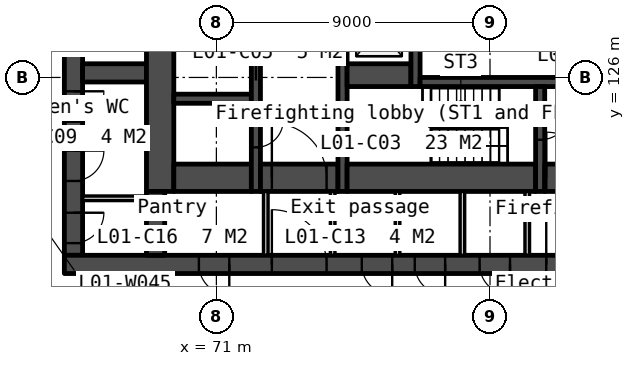
"""IFC4 building model, lengths in metres.
Left out: names, types, materials, properties, quantities, classifications, styles, units other than length and angle.
Written with IfcOpenShell. Run it as: python <this file> out.ifc"""

import sys

from ifc_helpers import new_model, si_unit, direction, frame, frame_2d, origin, place, context, subcontext, project, spatial, rectangle, extrude, element, fill, save


model = new_model("IFC4")
c1 = context("Model", 3, precision=1e-05, world=origin(), true_north=direction((0.0, 1.0)))
c2 = subcontext(c1, "Body", "Model", "MODEL_VIEW")
j1 = project(units=[si_unit("LENGTHUNIT", "METRE"), si_unit("PLANEANGLEUNIT", "RADIAN")], contexts=[c1])
p1 = place(None, origin())
s1 = spatial("IfcSite", under=j1, at=p1, CompositionType="ELEMENT")
p2 = place(p1, origin())
s2 = spatial("IfcBuilding", under=s1, at=p2, CompositionType="ELEMENT")
p3 = place(p2, frame((0.0, 0.0, 7.5)))
s3 = spatial("IfcBuildingStorey", under=s2, at=p3, CompositionType="ELEMENT", Elevation=7.5)
p4 = place(p3, frame((66.3, 133.95, 0.0), z_axis=(0.0, 0.0, 1.0), x_axis=(0.0, -1.0, 0.0)))
e1 = element("IfcWall", 1, at=p4, inside=s3, PredefinedType="SOLIDWALL", context=c2, shape_type="SweptSolid", body=[
    extrude(rectangle(XDim=13.8, YDim=0.6, at=frame_2d((6.9, 0.0))), origin(), (0.0, 0.0, 1.0), 5.7),
])
p5 = place(p4, frame((0.6, 0.0, 0.0)))
e2 = element("IfcOpeningElement", 2, at=p5, cuts=e1, PredefinedType="OPENING", context=c2, shape_type="SweptSolid", body=[
    extrude(rectangle(XDim=1.1, YDim=2.1, at=frame_2d((0.55, 1.05))), frame((0.0, 0.31, 0.0), z_axis=(0.0, -1.0, 0.0), x_axis=(1.0, 0.0, 0.0)), (0.0, 0.0, 1.0), 0.62),
])
p6 = place(p4, frame((8.405, 0.0, 0.0)))
e3 = element("IfcOpeningElement", 3, at=p6, cuts=e1, PredefinedType="OPENING", context=c2, shape_type="SweptSolid", body=[
    extrude(rectangle(XDim=1.0, YDim=2.1, at=frame_2d((0.5, 1.05))), frame((0.0, 0.31, 0.0), z_axis=(0.0, -1.0, 0.0), x_axis=(1.0, 0.0, 0.0)), (0.0, 0.0, 1.0), 0.62),
])
p7 = place(p4, frame((10.355, 0.0, 0.0)))
e4 = element("IfcOpeningElement", 4, at=p7, cuts=e1, PredefinedType="OPENING", context=c2, shape_type="SweptSolid", body=[
    extrude(rectangle(XDim=1.0, YDim=2.1, at=frame_2d((0.5, 1.05))), frame((0.0, 0.31, 0.0), z_axis=(0.0, -1.0, 0.0), x_axis=(1.0, 0.0, 0.0)), (0.0, 0.0, 1.0), 0.62),
])
p8 = place(p4, frame((12.4, 0.0, 0.0)))
e5 = element("IfcOpeningElement", 5, at=p8, cuts=e1, PredefinedType="OPENING", context=c2, shape_type="SweptSolid", body=[
    extrude(rectangle(XDim=1.0, YDim=2.1, at=frame_2d((0.5, 1.05))), frame((0.0, 0.31, 0.0), z_axis=(0.0, -1.0, 0.0), x_axis=(1.0, 0.0, 0.0)), (0.0, 0.0, 1.0), 0.62),
])
p9 = place(p3, frame((66.0, 119.85, 0.0), z_axis=(0.0, 0.0, 1.0), x_axis=(1.0, 0.0, 0.0)))
e6 = element("IfcWall", 6, at=p9, inside=s3, PredefinedType="SOLIDWALL", context=c2, shape_type="SweptSolid", body=[
    extrude(rectangle(XDim=28.0, YDim=0.6, at=frame_2d((14.0, 0.0))), origin(), (0.0, 0.0, 1.0), 5.7),
])
p10 = place(p9, frame((6.825, 0.0, 0.0)))
e7 = element("IfcOpeningElement", 7, at=p10, cuts=e6, PredefinedType="OPENING", context=c2, shape_type="SweptSolid", body=[
    extrude(rectangle(XDim=1.8, YDim=2.1, at=frame_2d((0.9, 1.05))), frame((0.0, 0.31, 0.0), z_axis=(0.0, -1.0, 0.0), x_axis=(1.0, 0.0, 0.0)), (0.0, 0.0, 1.0), 0.62),
])
p11 = place(p9, frame((15.85, 0.0, 0.0)))
e8 = element("IfcOpeningElement", 8, at=p11, cuts=e6, PredefinedType="OPENING", context=c2, shape_type="SweptSolid", body=[
    extrude(rectangle(XDim=1.5, YDim=2.1, at=frame_2d((0.75, 1.05))), frame((0.0, 0.31, 0.0), z_axis=(0.0, -1.0, 0.0), x_axis=(1.0, 0.0, 0.0)), (0.0, 0.0, 1.0), 0.62),
])
p12 = place(p9, frame((19.375, 0.0, 0.0)))
e9 = element("IfcOpeningElement", 9, at=p12, cuts=e6, PredefinedType="OPENING", context=c2, shape_type="SweptSolid", body=[
    extrude(rectangle(XDim=1.8, YDim=2.1, at=frame_2d((0.9, 1.05))), frame((0.0, 0.31, 0.0), z_axis=(0.0, -1.0, 0.0), x_axis=(1.0, 0.0, 0.0)), (0.0, 0.0, 1.0), 0.62),
])
p13 = place(p9, frame((4.425, 0.0, 0.0)))
e10 = element("IfcOpeningElement", 10, at=p13, cuts=e6, PredefinedType="OPENING", context=c2, shape_type="SweptSolid", body=[
    extrude(rectangle(XDim=1.0, YDim=2.1, at=frame_2d((0.5, 1.05))), frame((0.0, 0.31, 0.0), z_axis=(0.0, -1.0, 0.0), x_axis=(1.0, 0.0, 0.0)), (0.0, 0.0, 1.0), 0.62),
])
p14 = place(p9, frame((9.783, 0.0, 0.0)))
e11 = element("IfcOpeningElement", 11, at=p14, cuts=e6, PredefinedType="OPENING", context=c2, shape_type="SweptSolid", body=[
    extrude(rectangle(XDim=1.0, YDim=2.1, at=frame_2d((0.5, 1.05))), frame((0.0, 0.31, 0.0), z_axis=(0.0, -1.0, 0.0), x_axis=(1.0, 0.0, 0.0)), (0.0, 0.0, 1.0), 0.62),
])
p15 = place(p9, frame((11.525, 0.0, 0.0)))
e12 = element("IfcOpeningElement", 12, at=p15, cuts=e6, PredefinedType="OPENING", context=c2, shape_type="SweptSolid", body=[
    extrude(rectangle(XDim=1.0, YDim=2.1, at=frame_2d((0.5, 1.05))), frame((0.0, 0.31, 0.0), z_axis=(0.0, -1.0, 0.0), x_axis=(1.0, 0.0, 0.0)), (0.0, 0.0, 1.0), 0.62),
])
p16 = place(p9, frame((13.658, 0.0, 0.0)))
e13 = element("IfcOpeningElement", 13, at=p16, cuts=e6, PredefinedType="OPENING", context=c2, shape_type="SweptSolid", body=[
    extrude(rectangle(XDim=1.0, YDim=2.1, at=frame_2d((0.5, 1.05))), frame((0.0, 0.31, 0.0), z_axis=(0.0, -1.0, 0.0), x_axis=(1.0, 0.0, 0.0)), (0.0, 0.0, 1.0), 0.62),
])
p17 = place(p9, frame((21.725, 0.0, 0.0)))
e14 = element("IfcOpeningElement", 14, at=p17, cuts=e6, PredefinedType="OPENING", context=c2, shape_type="SweptSolid", body=[
    extrude(rectangle(XDim=1.0, YDim=2.1, at=frame_2d((0.5, 1.05))), frame((0.0, 0.31, 0.0), z_axis=(0.0, -1.0, 0.0), x_axis=(1.0, 0.0, 0.0)), (0.0, 0.0, 1.0), 0.62),
])
p18 = place(p9, frame((23.425, 0.0, 0.0)))
e15 = element("IfcOpeningElement", 15, at=p18, cuts=e6, PredefinedType="OPENING", context=c2, shape_type="SweptSolid", body=[
    extrude(rectangle(XDim=1.0, YDim=2.1, at=frame_2d((0.5, 1.05))), frame((0.0, 0.31, 0.0), z_axis=(0.0, -1.0, 0.0), x_axis=(1.0, 0.0, 0.0)), (0.0, 0.0, 1.0), 0.62),
])
p19 = place(p3, frame((66.6, 126.15, 0.0), z_axis=(0.0, 0.0, 1.0), x_axis=(1.0, 0.0, 0.0)))
e16 = element("IfcWall", 16, at=p19, inside=s3, PredefinedType="SOLIDWALL", context=c2, shape_type="SweptSolid", body=[
    extrude(rectangle(XDim=2.1, YDim=0.6, at=frame_2d((1.05, 0.0))), origin(), (0.0, 0.0, 1.0), 5.7),
])
for number, where, z_axis, x_axis in (
    (17, (66.6, 124.165, 0.0), (0.0, 0.0, 1.0), (1.0, 0.0, 0.0)),
    (18, (66.6, 122.025, 0.0), (0.0, 0.0, 1.0), (1.0, 0.0, 0.0)),
):
    element("IfcWall", number, at=place(p3, frame(where, z_axis=z_axis, x_axis=x_axis)), inside=s3, PredefinedType="PARTITIONING", context=c2, shape_type="SweptSolid", body=[
        extrude(rectangle(XDim=2.1, YDim=0.15, at=frame_2d((1.05, 0.0))), origin(), (0.0, 0.0, 1.0), 5.7),
    ])
p20 = place(p3, frame((69.15, 133.95, 0.0), z_axis=(0.0, 0.0, 1.0), x_axis=(0.0, -1.0, 0.0)))
e19 = element("IfcWall", 19, at=p20, inside=s3, PredefinedType="SOLIDWALL", context=c2, shape_type="SweptSolid", body=[
    extrude(rectangle(XDim=11.7, YDim=0.9, at=frame_2d((5.85, 0.0))), origin(), (0.0, 0.0, 1.0), 5.7),
])
p21 = place(p3, frame((69.0, 122.25, 0.0), z_axis=(0.0, 0.0, 1.0), x_axis=(0.0, -1.0, 0.0)))
e20 = element("IfcWall", 20, at=p21, inside=s3, PredefinedType="SOLIDWALL", context=c2, shape_type="SweptSolid", body=[
    extrude(rectangle(XDim=2.1, YDim=0.6, at=frame_2d((1.05, 0.0))), origin(), (0.0, 0.0, 1.0), 5.7),
])
p22 = place(p3, frame((69.6, 125.3, 0.0), z_axis=(0.0, 0.0, 1.0), x_axis=(1.0, 0.0, 0.0)))
e21 = element("IfcWall", 21, at=p22, inside=s3, PredefinedType="SOLIDWALL", context=c2, shape_type="SweptSolid", body=[
    extrude(rectangle(XDim=2.55, YDim=0.3, at=frame_2d((1.275, 0.0))), origin(), (0.0, 0.0, 1.0), 5.7),
])
p23 = place(p3, frame((69.6, 122.7, 0.0), z_axis=(0.0, 0.0, 1.0), x_axis=(1.0, 0.0, 0.0)))
e22 = element("IfcWall", 22, at=p23, inside=s3, PredefinedType="SOLIDWALL", context=c2, shape_type="SweptSolid", body=[
    extrude(rectangle(XDim=2.55, YDim=0.9, at=frame_2d((1.275, 0.0))), origin(), (0.0, 0.0, 1.0), 5.7),
])
p24 = place(p3, frame((72.3, 133.95, 0.0), z_axis=(0.0, 0.0, 1.0), x_axis=(0.0, -1.0, 0.0)))
e23 = element("IfcWall", 23, at=p24, inside=s3, PredefinedType="SOLIDWALL", context=c2, shape_type="SweptSolid", body=[
    extrude(rectangle(XDim=11.7, YDim=0.3, at=frame_2d((5.85, 0.0))), origin(), (0.0, 0.0, 1.0), 5.7),
])
p25 = place(p24, frame((6.95, 0.0, 0.0)))
e24 = element("IfcOpeningElement", 24, at=p25, cuts=e23, PredefinedType="OPENING", context=c2, shape_type="SweptSolid", body=[
    extrude(rectangle(XDim=1.1, YDim=2.1, at=frame_2d((0.55, 1.05))), frame((0.0, 0.16, 0.0), z_axis=(0.0, -1.0, 0.0), x_axis=(1.0, 0.0, 0.0)), (0.0, 0.0, 1.0), 0.32),
])
p26 = place(p24, frame((9.35, 0.0, 0.0)))
e25 = element("IfcOpeningElement", 25, at=p26, cuts=e23, PredefinedType="OPENING", context=c2, shape_type="SweptSolid", body=[
    extrude(rectangle(XDim=0.9, YDim=2.1, at=frame_2d((0.45, 1.05))), frame((0.0, 0.16, 0.0), z_axis=(0.0, -1.0, 0.0), x_axis=(1.0, 0.0, 0.0)), (0.0, 0.0, 1.0), 0.32),
])
p27 = place(p24, frame((5.1, 0.0, 0.0)))
e26 = element("IfcOpeningElement", 26, at=p27, cuts=e23, PredefinedType="OPENING", context=c2, shape_type="SweptSolid", body=[
    extrude(rectangle(XDim=1.0, YDim=2.1, at=frame_2d((0.5, 1.05))), frame((0.0, 0.16, 0.0), z_axis=(0.0, -1.0, 0.0), x_axis=(1.0, 0.0, 0.0)), (0.0, 0.0, 1.0), 0.32),
])
p28 = place(p3, frame((72.45, 122.7, 0.0), z_axis=(0.0, 0.0, 1.0), x_axis=(1.0, 0.0, 0.0)))
e27 = element("IfcWall", 27, at=p28, inside=s3, PredefinedType="SOLIDWALL", context=c2, shape_type="SweptSolid", body=[
    extrude(rectangle(XDim=2.55, YDim=0.9, at=frame_2d((1.275, 0.0))), origin(), (0.0, 0.0, 1.0), 5.7),
])
p29 = place(p28, frame((0.375, 0.0, 0.0)))
e28 = element("IfcOpeningElement", 28, at=p29, cuts=e27, PredefinedType="OPENING", context=c2, shape_type="SweptSolid", body=[
    extrude(rectangle(XDim=1.8, YDim=2.1, at=frame_2d((0.9, 1.05))), frame((0.0, 0.46, 0.0), z_axis=(0.0, -1.0, 0.0), x_axis=(1.0, 0.0, 0.0)), (0.0, 0.0, 1.0), 0.92),
])
for number, where, z_axis, x_axis in (
    (29, (72.625, 122.25, 0.0), (0.0, 0.0, 1.0), (0.0, -1.0, 0.0)),
    (30, (74.825, 122.25, 0.0), (0.0, 0.0, 1.0), (0.0, -1.0, 0.0)),
):
    element("IfcWall", number, at=place(p3, frame(where, z_axis=z_axis, x_axis=x_axis)), inside=s3, PredefinedType="PARTITIONING", context=c2, shape_type="SweptSolid", body=[
        extrude(rectangle(XDim=2.1, YDim=0.15, at=frame_2d((1.05, 0.0))), origin(), (0.0, 0.0, 1.0), 5.7),
    ])
p30 = place(p3, frame((75.15, 133.95, 0.0), z_axis=(0.0, 0.0, 1.0), x_axis=(0.0, -1.0, 0.0)))
e31 = element("IfcWall", 31, at=p30, inside=s3, PredefinedType="SOLIDWALL", context=c2, shape_type="SweptSolid", body=[
    extrude(rectangle(XDim=11.7, YDim=0.3, at=frame_2d((5.85, 0.0))), origin(), (0.0, 0.0, 1.0), 5.7),
])
p31 = place(p3, frame((75.3, 126.075, 0.0), z_axis=(0.0, 0.0, 1.0), x_axis=(1.0, 0.0, 0.0)))
e32 = element("IfcWall", 32, at=p31, inside=s3, PredefinedType="SOLIDWALL", context=c2, shape_type="SweptSolid", body=[
    extrude(rectangle(XDim=2.1, YDim=0.75, at=frame_2d((1.05, 0.0))), origin(), (0.0, 0.0, 1.0), 5.7),
])
p32 = place(p3, frame((75.3, 122.7, 0.0), z_axis=(0.0, 0.0, 1.0), x_axis=(1.0, 0.0, 0.0)))
e33 = element("IfcWall", 33, at=p32, inside=s3, PredefinedType="SOLIDWALL", context=c2, shape_type="SweptSolid", body=[
    extrude(rectangle(XDim=6.2, YDim=0.9, at=frame_2d((3.1, 0.0))), origin(), (0.0, 0.0, 1.0), 5.7),
])
p33 = place(p3, frame((76.958, 122.25, 0.0), z_axis=(0.0, 0.0, 1.0), x_axis=(0.0, -1.0, 0.0)))
e34 = element("IfcWall", 34, at=p33, inside=s3, PredefinedType="PARTITIONING", context=c2, shape_type="SweptSolid", body=[
    extrude(rectangle(XDim=2.1, YDim=0.15, at=frame_2d((1.05, 0.0))), origin(), (0.0, 0.0, 1.0), 5.7),
])
p34 = place(p3, frame((77.55, 133.95, 0.0), z_axis=(0.0, 0.0, 1.0), x_axis=(0.0, -1.0, 0.0)))
e35 = element("IfcWall", 35, at=p34, inside=s3, PredefinedType="SOLIDWALL", context=c2, shape_type="SweptSolid", body=[
    extrude(rectangle(XDim=8.25, YDim=0.3, at=frame_2d((4.125, 0.0))), origin(), (0.0, 0.0, 1.0), 5.7),
])
p35 = place(p34, frame((0.6, 0.0, 0.0)))
e36 = element("IfcOpeningElement", 36, at=p35, cuts=e35, PredefinedType="OPENING", context=c2, shape_type="SweptSolid", body=[
    extrude(rectangle(XDim=1.1, YDim=2.1, at=frame_2d((0.55, 1.05))), frame((0.0, 0.16, 0.0), z_axis=(0.0, -1.0, 0.0), x_axis=(1.0, 0.0, 0.0)), (0.0, 0.0, 1.0), 0.32),
])
p36 = place(p34, frame((3.2, 0.0, 0.0)))
e37 = element("IfcOpeningElement", 37, at=p36, cuts=e35, PredefinedType="OPENING", context=c2, shape_type="SweptSolid", body=[
    extrude(rectangle(XDim=1.1, YDim=2.1, at=frame_2d((0.55, 1.05))), frame((0.0, 0.16, 0.0), z_axis=(0.0, -1.0, 0.0), x_axis=(1.0, 0.0, 0.0)), (0.0, 0.0, 1.0), 0.32),
])
p37 = place(p34, frame((5.8, 0.0, 0.0)))
e38 = element("IfcOpeningElement", 38, at=p37, cuts=e35, PredefinedType="OPENING", context=c2, shape_type="SweptSolid", body=[
    extrude(rectangle(XDim=1.1, YDim=2.1, at=frame_2d((0.55, 1.05))), frame((0.0, 0.16, 0.0), z_axis=(0.0, -1.0, 0.0), x_axis=(1.0, 0.0, 0.0)), (0.0, 0.0, 1.0), 0.32),
])
p38 = place(p3, frame((77.7, 125.85, 0.0), z_axis=(0.0, 0.0, 1.0), x_axis=(1.0, 0.0, 0.0)))
e39 = element("IfcWall", 39, at=p38, inside=s3, PredefinedType="SOLIDWALL", context=c2, shape_type="SweptSolid", body=[
    extrude(rectangle(XDim=4.6, YDim=0.3, at=frame_2d((2.3, 0.0))), origin(), (0.0, 0.0, 1.0), 5.7),
])
for number, where, z_axis, x_axis in (
    (40, (79.092, 122.25, 0.0), (0.0, 0.0, 1.0), (0.0, -1.0, 0.0)),
    (41, (81.225, 122.25, 0.0), (0.0, 0.0, 1.0), (0.0, -1.0, 0.0)),
):
    element("IfcWall", number, at=place(p3, frame(where, z_axis=z_axis, x_axis=x_axis)), inside=s3, PredefinedType="PARTITIONING", context=c2, shape_type="SweptSolid", body=[
        extrude(rectangle(XDim=2.1, YDim=0.15, at=frame_2d((1.05, 0.0))), origin(), (0.0, 0.0, 1.0), 5.7),
    ])
p39 = place(p3, frame((81.65, 125.7, 0.0), z_axis=(0.0, 0.0, 1.0), x_axis=(0.0, -1.0, 0.0)))
e42 = element("IfcWall", 42, at=p39, inside=s3, PredefinedType="SOLIDWALL", context=c2, shape_type="SweptSolid", body=[
    extrude(rectangle(XDim=3.45, YDim=0.3, at=frame_2d((1.725, 0.0))), origin(), (0.0, 0.0, 1.0), 5.7),
])
p40 = place(p39, frame((0.75, 0.0, 0.0)))
e43 = element("IfcOpeningElement", 43, at=p40, cuts=e42, PredefinedType="OPENING", context=c2, shape_type="SweptSolid", body=[
    extrude(rectangle(XDim=1.0, YDim=2.1, at=frame_2d((0.5, 1.05))), frame((0.0, 0.16, 0.0), z_axis=(0.0, -1.0, 0.0), x_axis=(1.0, 0.0, 0.0)), (0.0, 0.0, 1.0), 0.32),
])
p41 = place(p3, frame((81.8, 122.7, 0.0), z_axis=(0.0, 0.0, 1.0), x_axis=(1.0, 0.0, 0.0)))
e44 = element("IfcWall", 44, at=p41, inside=s3, PredefinedType="SOLIDWALL", context=c2, shape_type="SweptSolid", body=[
    extrude(rectangle(XDim=2.9, YDim=0.9, at=frame_2d((1.45, 0.0))), origin(), (0.0, 0.0, 1.0), 5.7),
])
p42 = place(p41, frame((0.05, 0.0, 0.0)))
e45 = element("IfcOpeningElement", 45, at=p42, cuts=e44, PredefinedType="OPENING", context=c2, shape_type="SweptSolid", body=[
    extrude(rectangle(XDim=1.5, YDim=2.1, at=frame_2d((0.75, 1.05))), frame((0.0, 0.46, 0.0), z_axis=(0.0, -1.0, 0.0), x_axis=(1.0, 0.0, 0.0)), (0.0, 0.0, 1.0), 0.92),
])
p43 = place(p25, origin())
e46 = element("IfcDoor", 46, at=p43, inside=s3, OperationType="SLIDING_TO_LEFT", PredefinedType="DOOR", context=c2, shape_type="SweptSolid", body=[
    extrude(rectangle(XDim=1.1, YDim=2.1, at=frame_2d((0.55, 1.05))), frame((0.0, 0.025, 0.0), z_axis=(0.0, -1.0, 0.0), x_axis=(1.0, 0.0, 0.0)), (0.0, 0.0, 1.0), 0.05),
])
fill(e24, e46)
p44 = place(p29, origin())
e47 = element("IfcDoor", 47, at=p44, inside=s3, OperationType="DOUBLE_DOOR_DOUBLE_SWING", PredefinedType="DOOR", context=c2, shape_type="SweptSolid", body=[
    extrude(rectangle(XDim=1.8, YDim=2.1, at=frame_2d((0.9, 1.05))), frame((0.0, 0.025, 0.0), z_axis=(0.0, -1.0, 0.0), x_axis=(1.0, 0.0, 0.0)), (0.0, 0.0, 1.0), 0.05),
])
fill(e28, e47)
p45 = place(p42, origin())
e48 = element("IfcDoor", 48, at=p45, inside=s3, OperationType="DOUBLE_DOOR_DOUBLE_SWING", PredefinedType="DOOR", context=c2, shape_type="SweptSolid", body=[
    extrude(rectangle(XDim=1.5, YDim=2.1, at=frame_2d((0.75, 1.05))), frame((0.0, 0.025, 0.0), z_axis=(0.0, -1.0, 0.0), x_axis=(1.0, 0.0, 0.0)), (0.0, 0.0, 1.0), 0.05),
])
fill(e45, e48)
p46 = place(p10, origin())
e49 = element("IfcDoor", 49, at=p46, inside=s3, OperationType="DOUBLE_DOOR_DOUBLE_SWING", PredefinedType="DOOR", context=c2, shape_type="SweptSolid", body=[
    extrude(rectangle(XDim=1.8, YDim=2.1, at=frame_2d((0.9, 1.05))), frame((0.0, 0.025, 0.0), z_axis=(0.0, -1.0, 0.0), x_axis=(1.0, 0.0, 0.0)), (0.0, 0.0, 1.0), 0.05),
])
fill(e7, e49)
p47 = place(p11, origin())
e50 = element("IfcDoor", 50, at=p47, inside=s3, OperationType="DOUBLE_DOOR_DOUBLE_SWING", PredefinedType="DOOR", context=c2, shape_type="SweptSolid", body=[
    extrude(rectangle(XDim=1.5, YDim=2.1, at=frame_2d((0.75, 1.05))), frame((0.0, 0.025, 0.0), z_axis=(0.0, -1.0, 0.0), x_axis=(1.0, 0.0, 0.0)), (0.0, 0.0, 1.0), 0.05),
])
fill(e8, e50)
p48 = place(p26, origin())
e51 = element("IfcDoor", 51, at=p48, inside=s3, OperationType="SINGLE_SWING_LEFT", PredefinedType="DOOR", context=c2, shape_type="SweptSolid", body=[
    extrude(rectangle(XDim=0.9, YDim=2.1, at=frame_2d((0.45, 1.05))), frame((0.0, 0.025, 0.0), z_axis=(0.0, -1.0, 0.0), x_axis=(1.0, 0.0, 0.0)), (0.0, 0.0, 1.0), 0.05),
])
fill(e25, e51)
p49 = place(p13, origin())
e52 = element("IfcDoor", 52, at=p49, inside=s3, OperationType="SINGLE_SWING_RIGHT", PredefinedType="DOOR", context=c2, shape_type="SweptSolid", body=[
    extrude(rectangle(XDim=1.0, YDim=2.1, at=frame_2d((0.5, 1.05))), frame((0.0, 0.025, 0.0), z_axis=(0.0, -1.0, 0.0), x_axis=(1.0, 0.0, 0.0)), (0.0, 0.0, 1.0), 0.05),
])
fill(e10, e52)
p50 = place(p14, origin())
e53 = element("IfcDoor", 53, at=p50, inside=s3, OperationType="SINGLE_SWING_RIGHT", PredefinedType="DOOR", context=c2, shape_type="SweptSolid", body=[
    extrude(rectangle(XDim=1.0, YDim=2.1, at=frame_2d((0.5, 1.05))), frame((0.0, 0.025, 0.0), z_axis=(0.0, -1.0, 0.0), x_axis=(1.0, 0.0, 0.0)), (0.0, 0.0, 1.0), 0.05),
])
fill(e11, e53)
p51 = place(p15, origin())
e54 = element("IfcDoor", 54, at=p51, inside=s3, OperationType="SINGLE_SWING_RIGHT", PredefinedType="DOOR", context=c2, shape_type="SweptSolid", body=[
    extrude(rectangle(XDim=1.0, YDim=2.1, at=frame_2d((0.5, 1.05))), frame((0.0, 0.025, 0.0), z_axis=(0.0, -1.0, 0.0), x_axis=(1.0, 0.0, 0.0)), (0.0, 0.0, 1.0), 0.05),
])
fill(e12, e54)
p52 = place(p16, origin())
e55 = element("IfcDoor", 55, at=p52, inside=s3, OperationType="SINGLE_SWING_RIGHT", PredefinedType="DOOR", context=c2, shape_type="SweptSolid", body=[
    extrude(rectangle(XDim=1.0, YDim=2.1, at=frame_2d((0.5, 1.05))), frame((0.0, 0.025, 0.0), z_axis=(0.0, -1.0, 0.0), x_axis=(1.0, 0.0, 0.0)), (0.0, 0.0, 1.0), 0.05),
])
fill(e13, e55)
p53 = place(p40, origin())
e56 = element("IfcDoor", 56, at=p53, inside=s3, OperationType="SINGLE_SWING_LEFT", PredefinedType="DOOR", context=c2, shape_type="SweptSolid", body=[
    extrude(rectangle(XDim=1.0, YDim=2.1, at=frame_2d((0.5, 1.05))), frame((0.0, 0.025, 0.0), z_axis=(0.0, -1.0, 0.0), x_axis=(1.0, 0.0, 0.0)), (0.0, 0.0, 1.0), 0.05),
])
fill(e43, e56)
p54 = place(p6, origin())
e57 = element("IfcDoor", 57, at=p54, inside=s3, OperationType="SINGLE_SWING_LEFT", PredefinedType="DOOR", context=c2, shape_type="SweptSolid", body=[
    extrude(rectangle(XDim=1.0, YDim=2.1, at=frame_2d((0.5, 1.05))), frame((0.0, 0.025, 0.0), z_axis=(0.0, -1.0, 0.0), x_axis=(1.0, 0.0, 0.0)), (0.0, 0.0, 1.0), 0.05),
])
fill(e3, e57)
p55 = place(p7, origin())
e58 = element("IfcDoor", 58, at=p55, inside=s3, OperationType="SINGLE_SWING_LEFT", PredefinedType="DOOR", context=c2, shape_type="SweptSolid", body=[
    extrude(rectangle(XDim=1.0, YDim=2.1, at=frame_2d((0.5, 1.05))), frame((0.0, 0.025, 0.0), z_axis=(0.0, -1.0, 0.0), x_axis=(1.0, 0.0, 0.0)), (0.0, 0.0, 1.0), 0.05),
])
fill(e4, e58)
p56 = place(p8, origin())
e59 = element("IfcDoor", 59, at=p56, inside=s3, OperationType="SINGLE_SWING_LEFT", PredefinedType="DOOR", context=c2, shape_type="SweptSolid", body=[
    extrude(rectangle(XDim=1.0, YDim=2.1, at=frame_2d((0.5, 1.05))), frame((0.0, 0.025, 0.0), z_axis=(0.0, -1.0, 0.0), x_axis=(1.0, 0.0, 0.0)), (0.0, 0.0, 1.0), 0.05),
])
fill(e5, e59)
save(model, sys.argv[1])
